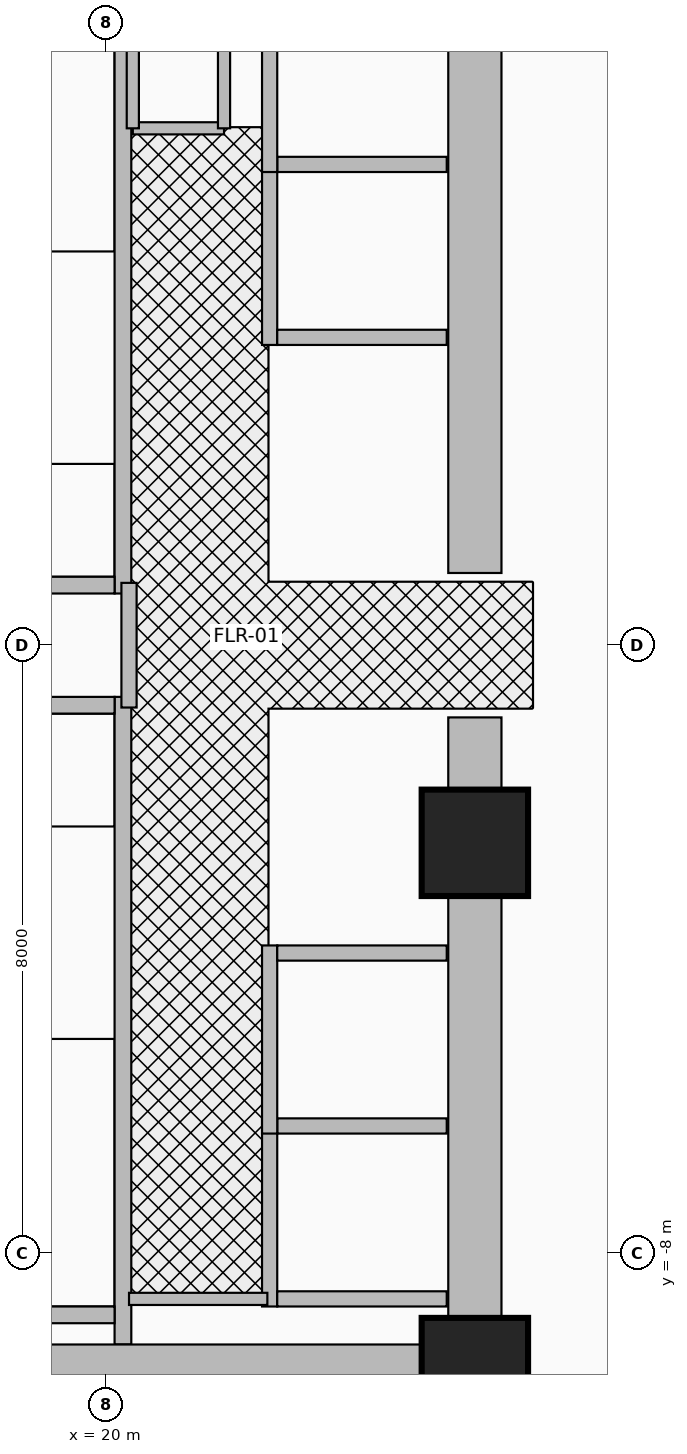
"""IFC4 building model, lengths in metres.
Left out: names, types, materials, properties, quantities, classifications, styles, units other than length and angle.
Written with IfcOpenShell. Run it as: python <this file> out.ifc"""

import sys

from ifc_helpers import new_model, si_unit, direction, frame, frame_2d, origin, origin_2d, place, context, subcontext, project, spatial, rectangle, extrude, source, transform, mapped, element, fill, save


model = new_model("IFC4")
c1 = context("Model", 3, precision=1e-05, world=origin(), true_north=direction((0.0, 1.0)))
c2 = subcontext(c1, "Body", "Model", "MODEL_VIEW")
j1 = project(units=[si_unit("LENGTHUNIT", "METRE"), si_unit("PLANEANGLEUNIT", "RADIAN")], contexts=[c1])
p1 = place(None, origin())
s1 = spatial("IfcSite", under=j1, at=p1, CompositionType="ELEMENT")
p2 = place(p1, origin())
s2 = spatial("IfcBuilding", under=s1, at=p2, CompositionType="ELEMENT")
p3 = place(p2, frame((0.0, 0.0, 70.4)))
s3 = spatial("IfcBuildingStorey", under=s2, at=p3, CompositionType="ELEMENT", Elevation=70.4)
p4 = place(p3, frame((20.22, 0.68, 0.0), z_axis=(0.0, 0.0, 1.0), x_axis=(0.0, 1.0, 0.0)))
e1 = element("IfcWall", 1, at=p4, inside=s3, PredefinedType="SHEAR", context=c2, shape_type="SweptSolid", body=[
    extrude(rectangle(XDim=8.52, YDim=0.22, at=frame_2d((4.26, 0.0))), origin(), (0.0, 0.0, 1.0), 3.46),
])
p5 = place(p3, frame((17.0, 0.79, 0.0), z_axis=(0.0, 0.0, 1.0), x_axis=(1.0, 0.0, 0.0)))
e2 = element("IfcWall", 2, at=p5, inside=s3, PredefinedType="SHEAR", context=c2, shape_type="SweptSolid", body=[
    extrude(rectangle(XDim=3.11, YDim=0.22, at=frame_2d((1.555, 0.0))), origin(), (0.0, 0.0, 1.0), 3.46),
])
p6 = place(p5, frame((0.95, 0.0, 0.0)))
e3 = element("IfcOpeningElement", 3, at=p6, cuts=e2, PredefinedType="OPENING", context=c2, shape_type="SweptSolid", body=[
    extrude(rectangle(XDim=1.1, YDim=2.15, at=frame_2d((0.55, 1.075))), frame((0.0, 0.125, 0.0), z_axis=(0.0, -1.0, 0.0), x_axis=(1.0, 0.0, 0.0)), (0.0, 0.0, 1.0), 0.25),
])
p7 = place(p3, frame((20.22, -9.2, 0.0), z_axis=(0.0, 0.0, 1.0), x_axis=(0.0, 1.0, 0.0)))
e4 = element("IfcWall", 4, at=p7, inside=s3, PredefinedType="SHEAR", context=c2, shape_type="SweptSolid", body=[
    extrude(rectangle(XDim=8.52, YDim=0.22, at=frame_2d((4.26, 0.0))), origin(), (0.0, 0.0, 1.0), 3.46),
])
p8 = place(p3, frame((17.0, -8.81, 0.0), z_axis=(0.0, 0.0, 1.0), x_axis=(1.0, 0.0, 0.0)))
e5 = element("IfcWall", 5, at=p8, inside=s3, PredefinedType="SHEAR", context=c2, shape_type="SweptSolid", body=[
    extrude(rectangle(XDim=3.11, YDim=0.22, at=frame_2d((1.555, 0.0))), origin(), (0.0, 0.0, 1.0), 3.46),
])
p9 = place(p3, frame((17.0, -0.79, 0.0), z_axis=(0.0, 0.0, 1.0), x_axis=(1.0, 0.0, 0.0)))
e6 = element("IfcWall", 6, at=p9, inside=s3, PredefinedType="SHEAR", context=c2, shape_type="SweptSolid", body=[
    extrude(rectangle(XDim=3.11, YDim=0.22, at=frame_2d((1.555, 0.0))), origin(), (0.0, 0.0, 1.0), 3.46),
])
p10 = place(p9, frame((0.95, 0.0, 0.0)))
e7 = element("IfcOpeningElement", 7, at=p10, cuts=e6, PredefinedType="OPENING", context=c2, shape_type="SweptSolid", body=[
    extrude(rectangle(XDim=1.1, YDim=2.15, at=frame_2d((0.55, 1.075))), frame((0.0, 0.125, 0.0), z_axis=(0.0, -1.0, 0.0), x_axis=(1.0, 0.0, 0.0)), (0.0, 0.0, 1.0), 0.25),
])
for number, where, z_axis, x_axis in (
    (8, (24.85, -9.9, 0.0), (0.0, 0.0, 1.0), (0.0, 1.0, 0.0)),
    (9, (24.85, 0.95, 0.0), (0.0, 0.0, 1.0), (0.0, 1.0, 0.0)),
):
    element("IfcWall", number, at=place(p3, frame(where, z_axis=z_axis, x_axis=x_axis)), inside=s3, PredefinedType="SHEAR", context=c2, shape_type="SweptSolid", body=[
        extrude(rectangle(XDim=8.95, YDim=0.7, at=frame_2d((4.475, 0.0))), origin(), (0.0, 0.0, 1.0), 3.46),
    ])
p11 = place(p3, frame((15.85, -9.55, 0.0), z_axis=(0.0, 0.0, 1.0), x_axis=(1.0, 0.0, 0.0)))
e10 = element("IfcWall", 10, at=p11, inside=s3, PredefinedType="SHEAR", context=c2, shape_type="SweptSolid", body=[
    extrude(rectangle(XDim=9.0, YDim=0.7, at=frame_2d((4.5, 0.0))), origin(), (0.0, 0.0, 1.0), 3.46),
])
m1 = source(origin(), c2, "Body", "SweptSolid", [
    extrude(rectangle(XDim=1.4, YDim=1.4, at=origin_2d()), origin(), (0.0, 0.0, 1.0), 3.7),
])
for number, where, z_axis, x_axis in (
    (11, (24.85, -9.55, 0.0), (0.0, 0.0, 1.0), (1.0, 0.0, 0.0)),
    (12, (24.85, -2.6, 0.0), (0.0, 0.0, 1.0), (1.0, 0.0, 0.0)),
):
    element("IfcColumn", number, at=place(p3, frame(where, z_axis=z_axis, x_axis=x_axis)), inside=s3, PredefinedType="COLUMN", context=c2, shape_type="MappedRepresentation", body=[
        mapped(m1, transform((0.0, 0.0, 0.0), x_axis=(1.0, 0.0, 0.0), y_axis=(0.0, 1.0, 0.0), z_axis=(0.0, 0.0, 1.0), scale=1.0)),
    ])
p12 = place(p3, frame((22.15, -8.7, 0.0), z_axis=(0.0, 0.0, 1.0), x_axis=(0.0, 1.0, 0.0)))
e13 = element("IfcWall", 13, at=p12, inside=s3, PredefinedType="MOVABLE", context=c2, shape_type="SweptSolid", body=[
    extrude(rectangle(XDim=2.475, YDim=0.2, at=frame_2d((1.237, 0.0))), origin(), (0.0, 0.0, 1.0), 3.46),
])
p13 = place(p12, frame((0.688, 0.0, 0.0)))
e14 = element("IfcOpeningElement", 14, at=p13, cuts=e13, PredefinedType="OPENING", context=c2, shape_type="SweptSolid", body=[
    extrude(rectangle(XDim=1.1, YDim=2.1, at=frame_2d((0.55, 1.05))), frame((0.0, 0.115, 0.0), z_axis=(0.0, -1.0, 0.0), x_axis=(1.0, 0.0, 0.0)), (0.0, 0.0, 1.0), 0.23),
])
for number, where, z_axis, x_axis in (
    (15, (22.25, -8.6, 0.0), (0.0, 0.0, 1.0), (1.0, 0.0, 0.0)),
    (16, (22.25, -6.325, 0.0), (0.0, 0.0, 1.0), (1.0, 0.0, 0.0)),
):
    element("IfcWall", number, at=place(p3, frame(where, z_axis=z_axis, x_axis=x_axis)), inside=s3, PredefinedType="MOVABLE", context=c2, shape_type="SweptSolid", body=[
        extrude(rectangle(XDim=2.23, YDim=0.2, at=frame_2d((1.115, 0.0))), origin(), (0.0, 0.0, 1.0), 3.46),
    ])
p14 = place(p3, frame((22.15, -6.425, 0.0), z_axis=(0.0, 0.0, 1.0), x_axis=(0.0, 1.0, 0.0)))
e17 = element("IfcWall", 17, at=p14, inside=s3, PredefinedType="MOVABLE", context=c2, shape_type="SweptSolid", body=[
    extrude(rectangle(XDim=2.475, YDim=0.2, at=frame_2d((1.238, 0.0))), origin(), (0.0, 0.0, 1.0), 3.46),
])
p15 = place(p14, frame((0.688, 0.0, 0.0)))
e18 = element("IfcOpeningElement", 18, at=p15, cuts=e17, PredefinedType="OPENING", context=c2, shape_type="SweptSolid", body=[
    extrude(rectangle(XDim=1.1, YDim=2.1, at=frame_2d((0.55, 1.05))), frame((0.0, 0.115, 0.0), z_axis=(0.0, -1.0, 0.0), x_axis=(1.0, 0.0, 0.0)), (0.0, 0.0, 1.0), 0.23),
])
p16 = place(p3, frame((22.25, -4.05, 0.0), z_axis=(0.0, 0.0, 1.0), x_axis=(1.0, 0.0, 0.0)))
e19 = element("IfcWall", 19, at=p16, inside=s3, PredefinedType="MOVABLE", context=c2, shape_type="SweptSolid", body=[
    extrude(rectangle(XDim=2.23, YDim=0.2, at=frame_2d((1.115, 0.0))), origin(), (0.0, 0.0, 1.0), 3.46),
])
p17 = place(p3, frame((22.15, 3.95, 0.0), z_axis=(0.0, 0.0, 1.0), x_axis=(0.0, 1.0, 0.0)))
e20 = element("IfcWall", 20, at=p17, inside=s3, PredefinedType="MOVABLE", context=c2, shape_type="SweptSolid", body=[
    extrude(rectangle(XDim=2.475, YDim=0.2, at=frame_2d((1.238, 0.0))), origin(), (0.0, 0.0, 1.0), 3.46),
])
for number, where, z_axis, x_axis in (
    (21, (22.25, 4.05, 0.0), (0.0, 0.0, 1.0), (1.0, 0.0, 0.0)),
    (22, (22.25, 6.325, 0.0), (0.0, 0.0, 1.0), (1.0, 0.0, 0.0)),
):
    element("IfcWall", number, at=place(p3, frame(where, z_axis=z_axis, x_axis=x_axis)), inside=s3, PredefinedType="MOVABLE", context=c2, shape_type="SweptSolid", body=[
        extrude(rectangle(XDim=2.23, YDim=0.2, at=frame_2d((1.115, 0.0))), origin(), (0.0, 0.0, 1.0), 2.245),
    ])
p18 = place(p3, frame((22.15, 6.225, 0.0), z_axis=(0.0, 0.0, 1.0), x_axis=(0.0, 1.0, 0.0)))
e23 = element("IfcWall", 23, at=p18, inside=s3, PredefinedType="MOVABLE", context=c2, shape_type="SweptSolid", body=[
    extrude(rectangle(XDim=2.475, YDim=0.2, at=frame_2d((1.237, 0.0))), origin(), (0.0, 0.0, 1.0), 3.46),
])
p19 = place(p3, frame((20.3, -0.82, 0.0), z_axis=(0.0, 0.0, 1.0), x_axis=(0.0, 1.0, 0.0)))
e24 = element("IfcWall", 24, at=p19, inside=s3, PredefinedType="PARTITIONING", context=c2, shape_type="SweptSolid", body=[
    extrude(rectangle(XDim=1.64, YDim=0.2, at=frame_2d((0.82, 0.0))), origin(), (0.0, 0.0, 1.0), 3.46),
])
p20 = place(p19, frame((0.295, 0.0, 0.0)))
e25 = element("IfcOpeningElement", 25, at=p20, cuts=e24, PredefinedType="OPENING", context=c2, shape_type="SweptSolid", body=[
    extrude(rectangle(XDim=1.05, YDim=2.15, at=frame_2d((0.525, 1.075))), frame((0.0, 0.115, 0.0), z_axis=(0.0, -1.0, 0.0), x_axis=(1.0, 0.0, 0.0)), (0.0, 0.0, 1.0), 0.23),
])
p21 = place(p3, frame((20.35, 6.8, 0.0), z_axis=(0.0, 0.0, 1.0), x_axis=(1.0, 0.0, 0.0)))
e26 = element("IfcWall", 26, at=p21, inside=s3, PredefinedType="PARTITIONING", context=c2, shape_type="SweptSolid", body=[
    extrude(rectangle(XDim=1.2, YDim=0.16, at=frame_2d((0.6, 0.0))), origin(), (0.0, 0.0, 1.0), 3.46),
])
p22 = place(p21, frame((0.175, 0.0, 0.0)))
e27 = element("IfcOpeningElement", 27, at=p22, cuts=e26, PredefinedType="OPENING", context=c2, shape_type="SweptSolid", body=[
    extrude(rectangle(XDim=0.85, YDim=2.05, at=frame_2d((0.425, 1.025))), frame((0.0, 0.095, 0.0), z_axis=(0.0, -1.0, 0.0), x_axis=(1.0, 0.0, 0.0)), (0.0, 0.0, 1.0), 0.19),
])
for number, where, z_axis, x_axis in (
    (28, (21.55, 6.8, 0.0), (0.0, 0.0, 1.0), (0.0, 1.0, 0.0)),
    (29, (20.35, 6.8, 0.0), (0.0, 0.0, 1.0), (0.0, 1.0, 0.0)),
):
    element("IfcWall", number, at=place(p3, frame(where, z_axis=z_axis, x_axis=x_axis)), inside=s3, PredefinedType="PARTITIONING", context=c2, shape_type="SweptSolid", body=[
        extrude(rectangle(XDim=1.8, YDim=0.16, at=frame_2d((0.9, 0.0))), origin(), (0.0, 0.0, 1.0), 3.46),
    ])
p23 = place(p3, frame((20.3, -8.6, 0.0), z_axis=(0.0, 0.0, 1.0), x_axis=(1.0, 0.0, 0.0)))
e30 = element("IfcWall", 30, at=p23, inside=s3, PredefinedType="PARTITIONING", context=c2, shape_type="SweptSolid", body=[
    extrude(rectangle(XDim=1.82, YDim=0.16, at=frame_2d((0.91, 0.0))), origin(), (0.0, 0.0, 1.0), 3.46),
])
p24 = place(p13, origin())
e31 = element("IfcDoor", 31, at=p24, inside=s3, OperationType="DOUBLE_DOOR_SLIDING", PredefinedType="DOOR", context=c2, shape_type="SweptSolid", body=[
    extrude(rectangle(XDim=1.1, YDim=2.1, at=frame_2d((0.55, 1.05))), frame((0.0, 0.025, 0.0), z_axis=(0.0, -1.0, 0.0), x_axis=(1.0, 0.0, 0.0)), (0.0, 0.0, 1.0), 0.05),
])
fill(e14, e31)
p25 = place(p15, origin())
e32 = element("IfcDoor", 32, at=p25, inside=s3, OperationType="DOUBLE_DOOR_SLIDING", PredefinedType="DOOR", context=c2, shape_type="SweptSolid", body=[
    extrude(rectangle(XDim=1.1, YDim=2.1, at=frame_2d((0.55, 1.05))), frame((0.0, 0.025, 0.0), z_axis=(0.0, -1.0, 0.0), x_axis=(1.0, 0.0, 0.0)), (0.0, 0.0, 1.0), 0.05),
])
fill(e18, e32)
p26 = place(p20, origin())
e33 = element("IfcDoor", 33, at=p26, inside=s3, OperationType="SINGLE_SWING_RIGHT", PredefinedType="DOOR", context=c2, shape_type="SweptSolid", body=[
    extrude(rectangle(XDim=1.05, YDim=2.15, at=frame_2d((0.525, 1.075))), frame((0.0, 0.025, 0.0), z_axis=(0.0, -1.0, 0.0), x_axis=(1.0, 0.0, 0.0)), (0.0, 0.0, 1.0), 0.05),
])
fill(e25, e33)
p27 = place(p22, origin())
e34 = element("IfcDoor", 34, at=p27, inside=s3, OperationType="SINGLE_SWING_LEFT", PredefinedType="DOOR", context=c2, shape_type="SweptSolid", body=[
    extrude(rectangle(XDim=0.85, YDim=2.05, at=frame_2d((0.425, 1.025))), frame((0.0, 0.025, 0.0), z_axis=(0.0, -1.0, 0.0), x_axis=(1.0, 0.0, 0.0)), (0.0, 0.0, 1.0), 0.05),
])
fill(e27, e34)
save(model, sys.argv[1])
